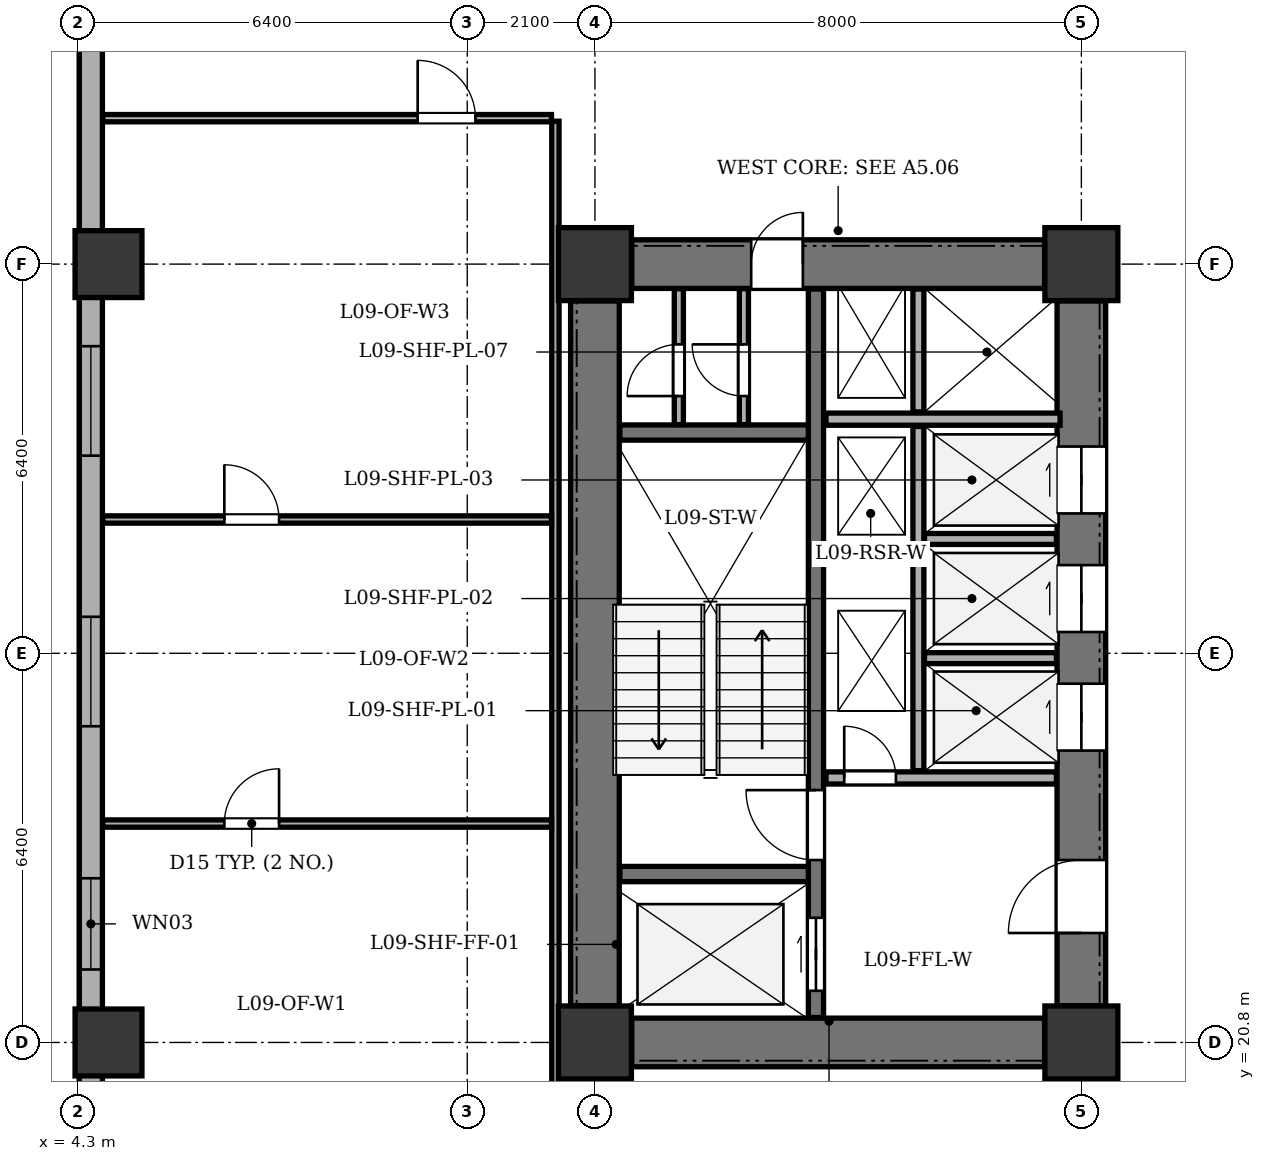
"""IFC4 building model, lengths in metres.
Left out: names, types, materials, properties, quantities, classifications, styles, units other than length and angle.
Written with IfcOpenShell. Run it as: python <this file> out.ifc"""

import sys

from ifc_helpers import new_model, si_unit, direction, frame, frame_2d, origin, origin_2d, place, context, subcontext, project, spatial, rectangle, extrude, element, fill, save


model = new_model("IFC4")
c1 = context("Model", 3, precision=1e-05, world=origin(), true_north=direction((0.0, 1.0)))
c2 = subcontext(c1, "Body", "Model", "MODEL_VIEW")
j1 = project(units=[si_unit("LENGTHUNIT", "METRE"), si_unit("PLANEANGLEUNIT", "RADIAN")], contexts=[c1])
p1 = place(None, origin())
s1 = spatial("IfcSite", under=j1, at=p1, CompositionType="ELEMENT")
p2 = place(p1, origin())
s2 = spatial("IfcBuilding", under=s1, at=p2, CompositionType="ELEMENT")
p3 = place(p2, frame((0.0, 0.0, 39.9)))
s3 = spatial("IfcBuildingStorey", under=s2, at=p3, CompositionType="ELEMENT", Elevation=39.9)
for number, where, z_axis, x_axis in (
    (1, (12.8, 20.8, 0.0), (0.0, 0.0, 1.0), (1.0, 0.0, 0.0)),
    (2, (20.8, 20.8, 0.0), (0.0, 0.0, 1.0), (1.0, 0.0, 0.0)),
    (3, (12.8, 33.6, 0.0), (0.0, 0.0, 1.0), (1.0, 0.0, 0.0)),
    (4, (20.8, 33.6, 0.0), (0.0, 0.0, 1.0), (1.0, 0.0, 0.0)),
):
    element("IfcColumn", number, at=place(p3, frame(where, z_axis=z_axis, x_axis=x_axis)), inside=s3, PredefinedType="COLUMN", context=c2, shape_type="SweptSolid", body=[
        extrude(rectangle(XDim=1.2, YDim=1.2, at=origin_2d()), origin(), (0.0, 0.0, 1.0), 3.9),
    ])
for number, where, z_axis, x_axis in (
    (5, (4.8, 20.8, 0.0), (0.0, 0.0, 1.0), (1.0, 0.0, 0.0)),
    (6, (4.8, 33.6, 0.0), (0.0, 0.0, 1.0), (1.0, 0.0, 0.0)),
):
    element("IfcColumn", number, at=place(p3, frame(where, z_axis=z_axis, x_axis=x_axis)), inside=s3, PredefinedType="COLUMN", context=c2, shape_type="SweptSolid", body=[
        extrude(rectangle(XDim=1.1, YDim=1.1, at=origin_2d()), origin(), (0.0, 0.0, 1.0), 3.9),
    ])
p4 = place(p3, frame((4.51, 6.5, 0.0), z_axis=(0.0, 0.0, 1.0), x_axis=(0.0, 1.0, 0.0)))
e7 = element("IfcWall", 7, at=p4, inside=s3, PredefinedType="STANDARD", context=c2, shape_type="SweptSolid", body=[
    extrude(rectangle(XDim=35.0, YDim=0.38, at=frame_2d((17.5, 0.0))), origin(), (0.0, 0.0, 1.0), 3.135),
])
p5 = place(p4, frame((2.693, 0.0, 0.8)))
e8 = element("IfcOpeningElement", 8, at=p5, cuts=e7, PredefinedType="OPENING", context=c2, shape_type="SweptSolid", body=[
    extrude(rectangle(XDim=1.8, YDim=1.9, at=frame_2d((0.9, 0.95))), frame((0.0, 0.2, 0.0), z_axis=(0.0, -1.0, 0.0), x_axis=(1.0, 0.0, 0.0)), (0.0, 0.0, 1.0), 0.4),
])
p6 = place(p4, frame((7.457, 0.0, 0.8)))
e9 = element("IfcOpeningElement", 9, at=p6, cuts=e7, PredefinedType="OPENING", context=c2, shape_type="SweptSolid", body=[
    extrude(rectangle(XDim=2.4, YDim=1.9, at=frame_2d((1.2, 0.95))), frame((0.0, 0.2, 0.0), z_axis=(0.0, -1.0, 0.0), x_axis=(1.0, 0.0, 0.0)), (0.0, 0.0, 1.0), 0.4),
])
p7 = place(p4, frame((15.5, 0.0, 0.8)))
e10 = element("IfcOpeningElement", 10, at=p7, cuts=e7, PredefinedType="OPENING", context=c2, shape_type="SweptSolid", body=[
    extrude(rectangle(XDim=1.5, YDim=1.9, at=frame_2d((0.75, 0.95))), frame((0.0, 0.2, 0.0), z_axis=(0.0, -1.0, 0.0), x_axis=(1.0, 0.0, 0.0)), (0.0, 0.0, 1.0), 0.4),
])
p8 = place(p4, frame((19.5, 0.0, 0.8)))
e11 = element("IfcOpeningElement", 11, at=p8, cuts=e7, PredefinedType="OPENING", context=c2, shape_type="SweptSolid", body=[
    extrude(rectangle(XDim=1.8, YDim=1.9, at=frame_2d((0.9, 0.95))), frame((0.0, 0.2, 0.0), z_axis=(0.0, -1.0, 0.0), x_axis=(1.0, 0.0, 0.0)), (0.0, 0.0, 1.0), 0.4),
])
p9 = place(p4, frame((23.95, 0.0, 0.8)))
e12 = element("IfcOpeningElement", 12, at=p9, cuts=e7, PredefinedType="OPENING", context=c2, shape_type="SweptSolid", body=[
    extrude(rectangle(XDim=1.8, YDim=1.9, at=frame_2d((0.9, 0.95))), frame((0.0, 0.2, 0.0), z_axis=(0.0, -1.0, 0.0), x_axis=(1.0, 0.0, 0.0)), (0.0, 0.0, 1.0), 0.4),
])
p10 = place(p4, frame((31.175, 0.0, 0.8)))
e13 = element("IfcOpeningElement", 13, at=p10, cuts=e7, PredefinedType="OPENING", context=c2, shape_type="SweptSolid", body=[
    extrude(rectangle(XDim=1.8, YDim=1.9, at=frame_2d((0.9, 0.95))), frame((0.0, 0.2, 0.0), z_axis=(0.0, -1.0, 0.0), x_axis=(1.0, 0.0, 0.0)), (0.0, 0.0, 1.0), 0.4),
])
p11 = place(p3, frame((12.8, 21.405, 0.0), z_axis=(0.0, 0.0, 1.0), x_axis=(0.0, 1.0, 0.0)))
e14 = element("IfcWall", 14, at=p11, inside=s3, PredefinedType="SHEAR", context=c2, shape_type="SweptSolid", body=[
    extrude(rectangle(XDim=11.59, YDim=0.8, at=frame_2d((5.795, 0.0))), origin(), (0.0, 0.0, 1.0), 3.6),
])
p12 = place(p3, frame((13.405, 20.8, 0.0), z_axis=(0.0, 0.0, 1.0), x_axis=(1.0, 0.0, 0.0)))
e15 = element("IfcWall", 15, at=p12, inside=s3, PredefinedType="SHEAR", context=c2, shape_type="SweptSolid", body=[
    extrude(rectangle(XDim=6.79, YDim=0.8, at=frame_2d((3.395, 0.0))), origin(), (0.0, 0.0, 1.0), 3.6),
])
p13 = place(p3, frame((13.405, 33.6, 0.0), z_axis=(0.0, 0.0, 1.0), x_axis=(1.0, 0.0, 0.0)))
e16 = element("IfcWall", 16, at=p13, inside=s3, PredefinedType="SHEAR", context=c2, shape_type="SweptSolid", body=[
    extrude(rectangle(XDim=6.79, YDim=0.8, at=frame_2d((3.395, 0.0))), origin(), (0.0, 0.0, 1.0), 3.6),
])
p14 = place(p13, frame((1.965, 0.0, 0.0)))
e17 = element("IfcOpeningElement", 17, at=p14, cuts=e16, PredefinedType="OPENING", context=c2, shape_type="SweptSolid", body=[
    extrude(rectangle(XDim=0.85, YDim=2.02, at=frame_2d((0.425, 1.01))), frame((0.0, 0.41, 0.0), z_axis=(0.0, -1.0, 0.0), x_axis=(1.0, 0.0, 0.0)), (0.0, 0.0, 1.0), 0.82),
])
p15 = place(p3, frame((20.8, 21.405, 0.0), z_axis=(0.0, 0.0, 1.0), x_axis=(0.0, 1.0, 0.0)))
e18 = element("IfcWall", 18, at=p15, inside=s3, PredefinedType="SHEAR", context=c2, shape_type="SweptSolid", body=[
    extrude(rectangle(XDim=11.59, YDim=0.8, at=frame_2d((5.795, 0.0))), origin(), (0.0, 0.0, 1.0), 3.6),
])
p16 = place(p15, frame((1.195, 0.0, 0.0)))
e19 = element("IfcOpeningElement", 19, at=p16, cuts=e18, PredefinedType="OPENING", context=c2, shape_type="SweptSolid", body=[
    extrude(rectangle(XDim=1.2, YDim=2.15, at=frame_2d((0.6, 1.075))), frame((0.0, 0.41, 0.0), z_axis=(0.0, -1.0, 0.0), x_axis=(1.0, 0.0, 0.0)), (0.0, 0.0, 1.0), 0.82),
])
p17 = place(p15, frame((4.195, 0.0, 0.0)))
e20 = element("IfcOpeningElement", 20, at=p17, cuts=e18, PredefinedType="OPENING", context=c2, shape_type="SweptSolid", body=[
    extrude(rectangle(XDim=1.1, YDim=2.1, at=frame_2d((0.55, 1.05))), frame((0.0, 0.41, 0.0), z_axis=(0.0, -1.0, 0.0), x_axis=(1.0, 0.0, 0.0)), (0.0, 0.0, 1.0), 0.82),
])
p18 = place(p15, frame((6.145, 0.0, 0.0)))
e21 = element("IfcOpeningElement", 21, at=p18, cuts=e18, PredefinedType="OPENING", context=c2, shape_type="SweptSolid", body=[
    extrude(rectangle(XDim=1.1, YDim=2.1, at=frame_2d((0.55, 1.05))), frame((0.0, 0.41, 0.0), z_axis=(0.0, -1.0, 0.0), x_axis=(1.0, 0.0, 0.0)), (0.0, 0.0, 1.0), 0.82),
])
p19 = place(p15, frame((8.095, 0.0, 0.0)))
e22 = element("IfcOpeningElement", 22, at=p19, cuts=e18, PredefinedType="OPENING", context=c2, shape_type="SweptSolid", body=[
    extrude(rectangle(XDim=1.1, YDim=2.1, at=frame_2d((0.55, 1.05))), frame((0.0, 0.41, 0.0), z_axis=(0.0, -1.0, 0.0), x_axis=(1.0, 0.0, 0.0)), (0.0, 0.0, 1.0), 0.82),
])
p20 = place(p3, frame((16.435, 21.21, 0.0), z_axis=(0.0, 0.0, 1.0), x_axis=(0.0, 1.0, 0.0)))
e23 = element("IfcWall", 23, at=p20, inside=s3, PredefinedType="SHEAR", context=c2, shape_type="SweptSolid", body=[
    extrude(rectangle(XDim=11.98, YDim=0.25, at=frame_2d((5.99, 0.0))), origin(), (0.0, 0.0, 1.0), 3.6),
])
p21 = place(p20, frame((0.44, 0.0, 0.0)))
e24 = element("IfcOpeningElement", 24, at=p21, cuts=e23, PredefinedType="OPENING", context=c2, shape_type="SweptSolid", body=[
    extrude(rectangle(XDim=1.2, YDim=2.15, at=frame_2d((0.6, 1.075))), frame((0.0, 0.135, 0.0), z_axis=(0.0, -1.0, 0.0), x_axis=(1.0, 0.0, 0.0)), (0.0, 0.0, 1.0), 0.27),
])
p22 = place(p20, frame((2.59, 0.0, 0.0)))
e25 = element("IfcOpeningElement", 25, at=p22, cuts=e23, PredefinedType="OPENING", context=c2, shape_type="SweptSolid", body=[
    extrude(rectangle(XDim=1.15, YDim=2.15, at=frame_2d((0.575, 1.075))), frame((0.0, 0.135, 0.0), z_axis=(0.0, -1.0, 0.0), x_axis=(1.0, 0.0, 0.0)), (0.0, 0.0, 1.0), 0.27),
])
for number, where, z_axis, x_axis in (
    (26, (13.21, 23.57, 0.0), (0.0, 0.0, 1.0), (1.0, 0.0, 0.0)),
    (27, (13.21, 30.83, 0.0), (0.0, 0.0, 1.0), (1.0, 0.0, 0.0)),
):
    element("IfcWall", number, at=place(p3, frame(where, z_axis=z_axis, x_axis=x_axis)), inside=s3, PredefinedType="SHEAR", context=c2, shape_type="SweptSolid", body=[
        extrude(rectangle(XDim=3.1, YDim=0.25, at=frame_2d((1.55, 0.0))), origin(), (0.0, 0.0, 1.0), 3.6),
    ])
p23 = place(p3, frame((16.6, 25.15, 0.0), z_axis=(0.0, 0.0, 1.0), x_axis=(1.0, 0.0, 0.0)))
e28 = element("IfcWall", 28, at=p23, inside=s3, PredefinedType="SOLIDWALL", context=c2, shape_type="SweptSolid", body=[
    extrude(rectangle(XDim=3.79, YDim=0.2, at=frame_2d((1.895, 0.0))), origin(), (0.0, 0.0, 1.0), 3.6),
])
p24 = place(p23, frame((0.3, 0.0, 0.0)))
e29 = element("IfcOpeningElement", 29, at=p24, cuts=e28, PredefinedType="OPENING", context=c2, shape_type="SweptSolid", body=[
    extrude(rectangle(XDim=0.85, YDim=2.02, at=frame_2d((0.425, 1.01))), frame((0.0, 0.11, 0.0), z_axis=(0.0, -1.0, 0.0), x_axis=(1.0, 0.0, 0.0)), (0.0, 0.0, 1.0), 0.22),
])
p25 = place(p3, frame((16.6, 31.05, 0.0), z_axis=(0.0, 0.0, 1.0), x_axis=(1.0, 0.0, 0.0)))
e30 = element("IfcWall", 30, at=p25, inside=s3, PredefinedType="SOLIDWALL", context=c2, shape_type="SweptSolid", body=[
    extrude(rectangle(XDim=3.85, YDim=0.2, at=frame_2d((1.925, 0.0))), origin(), (0.0, 0.0, 1.0), 3.6),
])
p26 = place(p3, frame((18.12, 25.27, 0.0), z_axis=(0.0, 0.0, 1.0), x_axis=(0.0, 1.0, 0.0)))
e31 = element("IfcWall", 31, at=p26, inside=s3, PredefinedType="PARTITIONING", context=c2, shape_type="SweptSolid", body=[
    extrude(rectangle(XDim=5.66, YDim=0.18, at=frame_2d((2.83, 0.0))), origin(), (0.0, 0.0, 1.0), 3.6),
])
p27 = place(p3, frame((18.12, 31.17, 0.0), z_axis=(0.0, 0.0, 1.0), x_axis=(0.0, 1.0, 0.0)))
e32 = element("IfcWall", 32, at=p27, inside=s3, PredefinedType="PARTITIONING", context=c2, shape_type="SweptSolid", body=[
    extrude(rectangle(XDim=2.02, YDim=0.18, at=frame_2d((1.01, 0.0))), origin(), (0.0, 0.0, 1.0), 3.6),
])
for number, where, z_axis, x_axis in (
    (33, (18.22, 27.12, 0.0), (0.0, 0.0, 1.0), (1.0, 0.0, 0.0)),
    (34, (18.22, 29.08, 0.0), (0.0, 0.0, 1.0), (1.0, 0.0, 0.0)),
):
    element("IfcWall", number, at=place(p3, frame(where, z_axis=z_axis, x_axis=x_axis)), inside=s3, PredefinedType="PARTITIONING", context=c2, shape_type="SweptSolid", body=[
        extrude(rectangle(XDim=2.17, YDim=0.18, at=frame_2d((1.085, 0.0))), origin(), (0.0, 0.0, 1.0), 3.6),
    ])
p28 = place(p3, frame((14.18, 30.96, 0.0), z_axis=(0.0, 0.0, 1.0), x_axis=(0.0, 1.0, 0.0)))
e35 = element("IfcWall", 35, at=p28, inside=s3, PredefinedType="PARTITIONING", context=c2, shape_type="SweptSolid", body=[
    extrude(rectangle(XDim=2.235, YDim=0.15, at=frame_2d((1.118, 0.0))), origin(), (0.0, 0.0, 1.0), 3.6),
])
p29 = place(p28, frame((0.47, 0.0, 0.0)))
e36 = element("IfcOpeningElement", 36, at=p29, cuts=e35, PredefinedType="OPENING", context=c2, shape_type="SweptSolid", body=[
    extrude(rectangle(XDim=0.85, YDim=2.02, at=frame_2d((0.425, 1.01))), frame((0.0, 0.085, 0.0), z_axis=(0.0, -1.0, 0.0), x_axis=(1.0, 0.0, 0.0)), (0.0, 0.0, 1.0), 0.17),
])
p30 = place(p3, frame((15.25, 30.96, 0.0), z_axis=(0.0, 0.0, 1.0), x_axis=(0.0, 1.0, 0.0)))
e37 = element("IfcWall", 37, at=p30, inside=s3, PredefinedType="PARTITIONING", context=c2, shape_type="SweptSolid", body=[
    extrude(rectangle(XDim=2.235, YDim=0.15, at=frame_2d((1.118, 0.0))), origin(), (0.0, 0.0, 1.0), 3.6),
])
p31 = place(p30, frame((0.47, 0.0, 0.0)))
e38 = element("IfcOpeningElement", 38, at=p31, cuts=e37, PredefinedType="OPENING", context=c2, shape_type="SweptSolid", body=[
    extrude(rectangle(XDim=0.85, YDim=2.02, at=frame_2d((0.425, 1.01))), frame((0.0, 0.085, 0.0), z_axis=(0.0, -1.0, 0.0), x_axis=(1.0, 0.0, 0.0)), (0.0, 0.0, 1.0), 0.17),
])
p32 = place(p3, frame((12.15, 18.45, 0.0), z_axis=(0.0, 0.0, 1.0), x_axis=(0.0, 1.0, 0.0)))
e39 = element("IfcWall", 39, at=p32, inside=s3, PredefinedType="PARTITIONING", context=c2, shape_type="SweptSolid", body=[
    extrude(rectangle(XDim=17.5, YDim=0.12, at=frame_2d((8.75, 0.0))), origin(), (0.0, 0.0, 1.0), 3.6),
])
p33 = place(p3, frame((4.705, 36.0, 0.0), z_axis=(0.0, 0.0, 1.0), x_axis=(1.0, 0.0, 0.0)))
e40 = element("IfcWall", 40, at=p33, inside=s3, PredefinedType="PARTITIONING", context=c2, shape_type="SweptSolid", body=[
    extrude(rectangle(XDim=7.38, YDim=0.12, at=frame_2d((3.69, 0.0))), origin(), (0.0, 0.0, 1.0), 3.6),
])
p34 = place(p33, frame((5.18, 0.0, 0.0)))
e41 = element("IfcOpeningElement", 41, at=p34, cuts=e40, PredefinedType="OPENING", context=c2, shape_type="SweptSolid", body=[
    extrude(rectangle(XDim=0.95, YDim=2.1, at=frame_2d((0.475, 1.05))), frame((0.0, 0.07, 0.0), z_axis=(0.0, -1.0, 0.0), x_axis=(1.0, 0.0, 0.0)), (0.0, 0.0, 1.0), 0.14),
])
p35 = place(p3, frame((4.705, 24.4, 0.0), z_axis=(0.0, 0.0, 1.0), x_axis=(1.0, 0.0, 0.0)))
e42 = element("IfcWall", 42, at=p35, inside=s3, PredefinedType="PARTITIONING", context=c2, shape_type="SweptSolid", body=[
    extrude(rectangle(XDim=7.38, YDim=0.12, at=frame_2d((3.69, 0.0))), origin(), (0.0, 0.0, 1.0), 3.6),
])
p36 = place(p35, frame((2.0, 0.0, 0.0)))
e43 = element("IfcOpeningElement", 43, at=p36, cuts=e42, PredefinedType="OPENING", context=c2, shape_type="SweptSolid", body=[
    extrude(rectangle(XDim=0.9, YDim=2.05, at=frame_2d((0.45, 1.025))), frame((0.0, 0.07, 0.0), z_axis=(0.0, -1.0, 0.0), x_axis=(1.0, 0.0, 0.0)), (0.0, 0.0, 1.0), 0.14),
])
p37 = place(p3, frame((4.705, 29.4, 0.0), z_axis=(0.0, 0.0, 1.0), x_axis=(1.0, 0.0, 0.0)))
e44 = element("IfcWall", 44, at=p37, inside=s3, PredefinedType="PARTITIONING", context=c2, shape_type="SweptSolid", body=[
    extrude(rectangle(XDim=7.38, YDim=0.12, at=frame_2d((3.69, 0.0))), origin(), (0.0, 0.0, 1.0), 3.6),
])
p38 = place(p37, frame((2.0, 0.0, 0.0)))
e45 = element("IfcOpeningElement", 45, at=p38, cuts=e44, PredefinedType="OPENING", context=c2, shape_type="SweptSolid", body=[
    extrude(rectangle(XDim=0.9, YDim=2.05, at=frame_2d((0.45, 1.025))), frame((0.0, 0.07, 0.0), z_axis=(0.0, -1.0, 0.0), x_axis=(1.0, 0.0, 0.0)), (0.0, 0.0, 1.0), 0.14),
])
p39 = place(p7, origin())
e46 = element("IfcWindow", 46, at=p39, inside=s3, PartitioningType="SINGLE_PANEL", PredefinedType="WINDOW", context=c2, shape_type="SweptSolid", body=[
    extrude(rectangle(XDim=1.5, YDim=1.9, at=frame_2d((0.75, 0.95))), frame((0.0, -0.01, 0.0), z_axis=(0.0, -1.0, 0.0), x_axis=(1.0, 0.0, 0.0)), (0.0, 0.0, 1.0), 0.06),
])
fill(e10, e46)
p40 = place(p8, origin())
e47 = element("IfcWindow", 47, at=p40, inside=s3, PartitioningType="SINGLE_PANEL", PredefinedType="WINDOW", context=c2, shape_type="SweptSolid", body=[
    extrude(rectangle(XDim=1.8, YDim=1.9, at=frame_2d((0.9, 0.95))), frame((0.0, -0.01, 0.0), z_axis=(0.0, -1.0, 0.0), x_axis=(1.0, 0.0, 0.0)), (0.0, 0.0, 1.0), 0.06),
])
fill(e11, e47)
p41 = place(p9, origin())
e48 = element("IfcWindow", 48, at=p41, inside=s3, PartitioningType="SINGLE_PANEL", PredefinedType="WINDOW", context=c2, shape_type="SweptSolid", body=[
    extrude(rectangle(XDim=1.8, YDim=1.9, at=frame_2d((0.9, 0.95))), frame((0.0, -0.01, 0.0), z_axis=(0.0, -1.0, 0.0), x_axis=(1.0, 0.0, 0.0)), (0.0, 0.0, 1.0), 0.06),
])
fill(e12, e48)
p42 = place(p14, origin())
e49 = element("IfcDoor", 49, at=p42, inside=s3, OperationType="SINGLE_SWING_RIGHT", PredefinedType="DOOR", context=c2, shape_type="SweptSolid", body=[
    extrude(rectangle(XDim=0.85, YDim=2.02, at=frame_2d((0.425, 1.01))), frame((0.0, 0.025, 0.0), z_axis=(0.0, -1.0, 0.0), x_axis=(1.0, 0.0, 0.0)), (0.0, 0.0, 1.0), 0.05),
])
fill(e17, e49)
p43 = place(p16, origin())
e50 = element("IfcDoor", 50, at=p43, inside=s3, OperationType="SINGLE_SWING_LEFT", PredefinedType="DOOR", context=c2, shape_type="SweptSolid", body=[
    extrude(rectangle(XDim=1.2, YDim=2.15, at=frame_2d((0.6, 1.075))), frame((0.0, 0.025, 0.0), z_axis=(0.0, -1.0, 0.0), x_axis=(1.0, 0.0, 0.0)), (0.0, 0.0, 1.0), 0.05),
])
fill(e19, e50)
p44 = place(p17, origin())
e51 = element("IfcDoor", 51, at=p44, inside=s3, OperationType="DOUBLE_DOOR_SLIDING", PredefinedType="DOOR", context=c2, shape_type="SweptSolid", body=[
    extrude(rectangle(XDim=1.1, YDim=2.1, at=frame_2d((0.55, 1.05))), frame((0.0, 0.025, 0.0), z_axis=(0.0, -1.0, 0.0), x_axis=(1.0, 0.0, 0.0)), (0.0, 0.0, 1.0), 0.05),
])
fill(e20, e51)
p45 = place(p18, origin())
e52 = element("IfcDoor", 52, at=p45, inside=s3, OperationType="DOUBLE_DOOR_SLIDING", PredefinedType="DOOR", context=c2, shape_type="SweptSolid", body=[
    extrude(rectangle(XDim=1.1, YDim=2.1, at=frame_2d((0.55, 1.05))), frame((0.0, 0.025, 0.0), z_axis=(0.0, -1.0, 0.0), x_axis=(1.0, 0.0, 0.0)), (0.0, 0.0, 1.0), 0.05),
])
fill(e21, e52)
p46 = place(p19, origin())
e53 = element("IfcDoor", 53, at=p46, inside=s3, OperationType="DOUBLE_DOOR_SLIDING", PredefinedType="DOOR", context=c2, shape_type="SweptSolid", body=[
    extrude(rectangle(XDim=1.1, YDim=2.1, at=frame_2d((0.55, 1.05))), frame((0.0, 0.025, 0.0), z_axis=(0.0, -1.0, 0.0), x_axis=(1.0, 0.0, 0.0)), (0.0, 0.0, 1.0), 0.05),
])
fill(e22, e53)
p47 = place(p21, origin())
e54 = element("IfcDoor", 54, at=p47, inside=s3, OperationType="DOUBLE_DOOR_SLIDING", PredefinedType="DOOR", context=c2, shape_type="SweptSolid", body=[
    extrude(rectangle(XDim=1.2, YDim=2.15, at=frame_2d((0.6, 1.075))), frame((0.0, 0.025, 0.0), z_axis=(0.0, -1.0, 0.0), x_axis=(1.0, 0.0, 0.0)), (0.0, 0.0, 1.0), 0.05),
])
fill(e24, e54)
p48 = place(p22, origin())
e55 = element("IfcDoor", 55, at=p48, inside=s3, OperationType="SINGLE_SWING_RIGHT", PredefinedType="DOOR", context=c2, shape_type="SweptSolid", body=[
    extrude(rectangle(XDim=1.15, YDim=2.15, at=frame_2d((0.575, 1.075))), frame((0.0, 0.025, 0.0), z_axis=(0.0, -1.0, 0.0), x_axis=(1.0, 0.0, 0.0)), (0.0, 0.0, 1.0), 0.05),
])
fill(e25, e55)
p49 = place(p24, origin())
e56 = element("IfcDoor", 56, at=p49, inside=s3, OperationType="SINGLE_SWING_LEFT", PredefinedType="DOOR", context=c2, shape_type="SweptSolid", body=[
    extrude(rectangle(XDim=0.85, YDim=2.02, at=frame_2d((0.425, 1.01))), frame((0.0, 0.025, 0.0), z_axis=(0.0, -1.0, 0.0), x_axis=(1.0, 0.0, 0.0)), (0.0, 0.0, 1.0), 0.05),
])
fill(e29, e56)
p50 = place(p29, origin())
e57 = element("IfcDoor", 57, at=p50, inside=s3, OperationType="SINGLE_SWING_LEFT", PredefinedType="DOOR", context=c2, shape_type="SweptSolid", body=[
    extrude(rectangle(XDim=0.85, YDim=2.02, at=frame_2d((0.425, 1.01))), frame((0.0, 0.025, 0.0), z_axis=(0.0, -1.0, 0.0), x_axis=(1.0, 0.0, 0.0)), (0.0, 0.0, 1.0), 0.05),
])
fill(e36, e57)
p51 = place(p31, origin())
e58 = element("IfcDoor", 58, at=p51, inside=s3, OperationType="SINGLE_SWING_RIGHT", PredefinedType="DOOR", context=c2, shape_type="SweptSolid", body=[
    extrude(rectangle(XDim=0.85, YDim=2.02, at=frame_2d((0.425, 1.01))), frame((0.0, 0.025, 0.0), z_axis=(0.0, -1.0, 0.0), x_axis=(1.0, 0.0, 0.0)), (0.0, 0.0, 1.0), 0.05),
])
fill(e38, e58)
p52 = place(p36, origin())
e59 = element("IfcDoor", 59, at=p52, inside=s3, OperationType="SINGLE_SWING_RIGHT", PredefinedType="DOOR", context=c2, shape_type="SweptSolid", body=[
    extrude(rectangle(XDim=0.9, YDim=2.05, at=frame_2d((0.45, 1.025))), frame((0.0, 0.025, 0.0), z_axis=(0.0, -1.0, 0.0), x_axis=(1.0, 0.0, 0.0)), (0.0, 0.0, 1.0), 0.05),
])
fill(e43, e59)
p53 = place(p38, origin())
e60 = element("IfcDoor", 60, at=p53, inside=s3, OperationType="SINGLE_SWING_LEFT", PredefinedType="DOOR", context=c2, shape_type="SweptSolid", body=[
    extrude(rectangle(XDim=0.9, YDim=2.05, at=frame_2d((0.45, 1.025))), frame((0.0, 0.025, 0.0), z_axis=(0.0, -1.0, 0.0), x_axis=(1.0, 0.0, 0.0)), (0.0, 0.0, 1.0), 0.05),
])
fill(e45, e60)
p54 = place(p34, origin())
e61 = element("IfcDoor", 61, at=p54, inside=s3, OperationType="SINGLE_SWING_LEFT", PredefinedType="DOOR", context=c2, shape_type="SweptSolid", body=[
    extrude(rectangle(XDim=0.95, YDim=2.1, at=frame_2d((0.475, 1.05))), frame((0.0, 0.025, 0.0), z_axis=(0.0, -1.0, 0.0), x_axis=(1.0, 0.0, 0.0)), (0.0, 0.0, 1.0), 0.05),
])
fill(e41, e61)
save(model, sys.argv[1])
